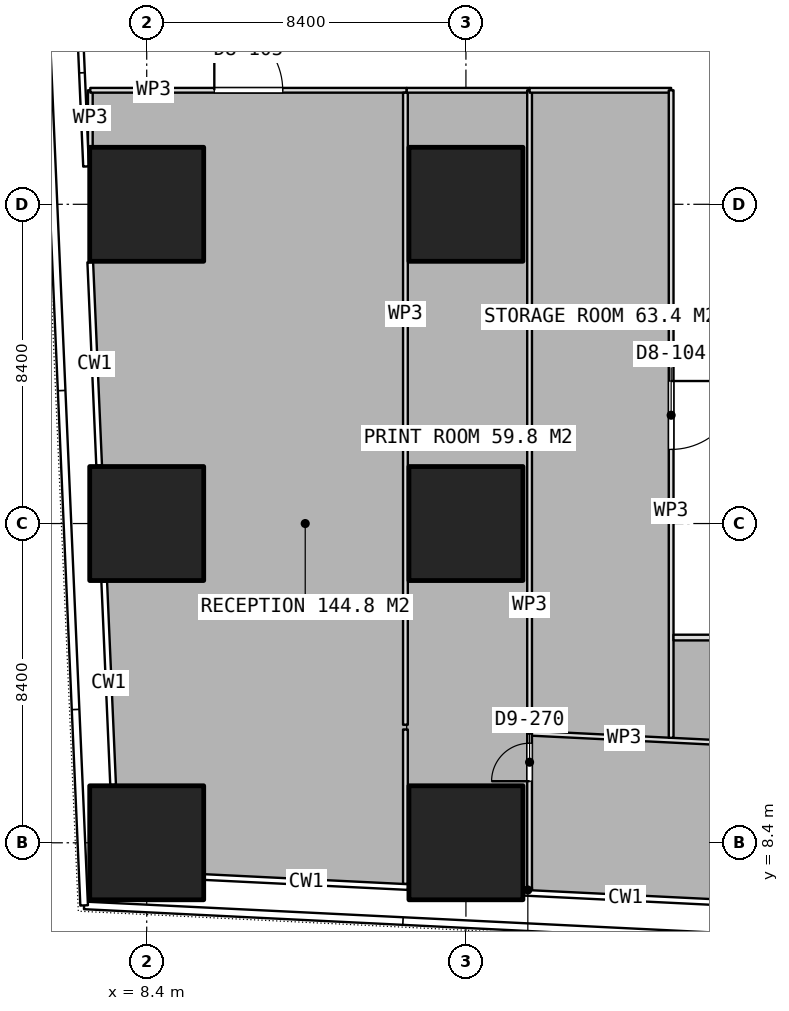
"""IFC4 building model, lengths in metres.
Left out: names, types, materials, properties, quantities, classifications, styles, units other than length and angle.
Written with IfcOpenShell. Run it as: python <this file> out.ifc"""

import sys

from ifc_helpers import new_model, si_unit, direction, frame, frame_2d, origin, origin_2d, place, context, subcontext, project, spatial, rectangle, extrude, element, fill, save


model = new_model("IFC4")
c1 = context("Model", 3, precision=1e-05, world=origin(), true_north=direction((0.0, 1.0)))
c2 = subcontext(c1, "Body", "Model", "MODEL_VIEW")
j1 = project(units=[si_unit("LENGTHUNIT", "METRE"), si_unit("PLANEANGLEUNIT", "RADIAN")], contexts=[c1])
p1 = place(None, origin())
s1 = spatial("IfcSite", under=j1, at=p1, CompositionType="ELEMENT")
p2 = place(p1, origin())
s2 = spatial("IfcBuilding", under=s1, at=p2, CompositionType="ELEMENT")
p3 = place(p2, frame((0.0, 0.0, 77.9)))
s3 = spatial("IfcBuildingStorey", under=s2, at=p3, CompositionType="ELEMENT", Elevation=77.9)
for number, where, z_axis, x_axis in (
    (1, (8.4, 8.4, 0.0), (0.0, 0.0, 1.0), (1.0, 0.0, 0.0)),
    (2, (8.4, 16.8, 0.0), (0.0, 0.0, 1.0), (1.0, 0.0, 0.0)),
    (3, (8.4, 25.2, 0.0), (0.0, 0.0, 1.0), (1.0, 0.0, 0.0)),
    (4, (16.8, 8.4, 0.0), (0.0, 0.0, 1.0), (1.0, 0.0, 0.0)),
    (5, (16.8, 16.8, 0.0), (0.0, 0.0, 1.0), (1.0, 0.0, 0.0)),
    (6, (16.8, 25.2, 0.0), (0.0, 0.0, 1.0), (1.0, 0.0, 0.0)),
):
    element("IfcColumn", number, at=place(p3, frame(where, z_axis=z_axis, x_axis=x_axis)), inside=s3, PredefinedType="COLUMN", context=c2, shape_type="SweptSolid", body=[
        extrude(rectangle(XDim=3.0, YDim=3.0, at=origin_2d()), origin(), (0.0, 0.0, 1.0), 3.75),
    ])
p4 = place(p3, frame((15.208, 11.381, 0.0), z_axis=(0.0, 0.0, 1.0), x_axis=(0.0, -1.0, 0.0)))
e7 = element("IfcWall", 7, at=p4, inside=s3, PredefinedType="PARTITIONING", context=c2, shape_type="SweptSolid", body=[
    extrude(rectangle(XDim=4.063, YDim=0.125, at=frame_2d((2.031, 0.0))), origin(), (0.0, 0.0, 1.0), 3.5),
])
p5 = place(p3, frame((18.475, 11.283, 0.0), z_axis=(0.0, 0.0, 1.0), x_axis=(0.998791733406, -0.049143395075, 0.0)))
e8 = element("IfcWall", 8, at=p5, inside=s3, PredefinedType="PARTITIONING", context=c2, shape_type="SweptSolid", body=[
    extrude(rectangle(XDim=4.983, YDim=0.125, at=frame_2d((2.491, 0.0))), origin(), (0.0, 0.0, 1.0), 3.5),
])
p6 = place(p3, frame((18.475, 7.158, 0.0), z_axis=(0.0, 0.0, 1.0), x_axis=(0.0, 1.0, 0.0)))
e9 = element("IfcWall", 9, at=p6, inside=s3, PredefinedType="PARTITIONING", context=c2, shape_type="SweptSolid", body=[
    extrude(rectangle(XDim=4.125, YDim=0.125, at=frame_2d((2.062, 0.0))), origin(), (0.0, 0.0, 1.0), 3.5),
])
p7 = place(p6, frame((2.862, 0.0, 0.0)))
e10 = element("IfcOpeningElement", 10, at=p7, cuts=e9, PredefinedType="OPENING", context=c2, shape_type="SweptSolid", body=[
    extrude(rectangle(XDim=1.0, YDim=2.1, at=frame_2d((0.5, 1.05))), frame((0.0, 0.073, 0.0), z_axis=(0.0, -1.0, 0.0), x_axis=(1.0, 0.0, 0.0)), (0.0, 0.0, 1.0), 0.145),
])
p8 = place(p3, frame((6.916, 26.72, 0.0), z_axis=(0.0, 0.0, 1.0), x_axis=(0.0, 1.0, 0.0)))
e11 = element("IfcWall", 11, at=p8, inside=s3, PredefinedType="PARTITIONING", context=c2, shape_type="SweptSolid", body=[
    extrude(rectangle(XDim=1.48, YDim=0.125, at=frame_2d((0.74, 0.0))), origin(), (0.0, 0.0, 1.0), 3.5),
])
p9 = place(p3, frame((6.916, 28.2, 0.0), z_axis=(0.0, 0.0, 1.0), x_axis=(1.0, 0.0, 0.0)))
e12 = element("IfcWall", 12, at=p9, inside=s3, PredefinedType="PARTITIONING", context=c2, shape_type="SweptSolid", body=[
    extrude(rectangle(XDim=8.326, YDim=0.125, at=frame_2d((4.163, 0.0))), origin(), (0.0, 0.0, 1.0), 3.5),
])
p10 = place(p9, frame((3.263, 0.0, 0.0)))
e13 = element("IfcOpeningElement", 13, at=p10, cuts=e12, PredefinedType="OPENING", context=c2, shape_type="SweptSolid", body=[
    extrude(rectangle(XDim=1.8, YDim=2.1, at=frame_2d((0.9, 1.05))), frame((0.0, 0.073, 0.0), z_axis=(0.0, -1.0, 0.0), x_axis=(1.0, 0.0, 0.0)), (0.0, 0.0, 1.0), 0.145),
])
p11 = place(p3, frame((15.208, 28.137, 0.0), z_axis=(0.0, 0.0, 1.0), x_axis=(0.0, -1.0, 0.0)))
e14 = element("IfcWall", 14, at=p11, inside=s3, PredefinedType="PARTITIONING", context=c2, shape_type="SweptSolid", body=[
    extrude(rectangle(XDim=16.631, YDim=0.125, at=frame_2d((8.315, 0.0))), origin(), (0.0, 0.0, 1.0), 3.5),
])
p12 = place(p3, frame((15.242, 28.2, 0.0), z_axis=(0.0, 0.0, 1.0), x_axis=(1.0, 0.0, 0.0)))
e15 = element("IfcWall", 15, at=p12, inside=s3, PredefinedType="PARTITIONING", context=c2, shape_type="SweptSolid", body=[
    extrude(rectangle(XDim=3.233, YDim=0.125, at=frame_2d((1.617, 0.0))), origin(), (0.0, 0.0, 1.0), 3.5),
])
p13 = place(p3, frame((18.475, 28.2, 0.0), z_axis=(0.0, 0.0, 1.0), x_axis=(0.0, -1.0, 0.0)))
e16 = element("IfcWall", 16, at=p13, inside=s3, PredefinedType="PARTITIONING", context=c2, shape_type="SweptSolid", body=[
    extrude(rectangle(XDim=16.917, YDim=0.125, at=frame_2d((8.458, 0.0))), origin(), (0.0, 0.0, 1.0), 3.5),
])
p14 = place(p3, frame((18.475, 28.2, 0.0), z_axis=(0.0, 0.0, 1.0), x_axis=(1.0, 0.0, 0.0)))
e17 = element("IfcWall", 17, at=p14, inside=s3, PredefinedType="PARTITIONING", context=c2, shape_type="SweptSolid", body=[
    extrude(rectangle(XDim=3.725, YDim=0.125, at=frame_2d((1.862, 0.0))), origin(), (0.0, 0.0, 1.0), 3.5),
])
p15 = place(p3, frame((22.2, 28.2, 0.0), z_axis=(0.0, 0.0, 1.0), x_axis=(0.0, -1.0, 0.0)))
e18 = element("IfcWall", 18, at=p15, inside=s3, PredefinedType="PARTITIONING", context=c2, shape_type="SweptSolid", body=[
    extrude(rectangle(XDim=17.038, YDim=0.125, at=frame_2d((8.519, 0.0))), origin(), (0.0, 0.0, 1.0), 3.5),
])
p16 = place(p15, frame((7.65, 0.0, 0.0)))
e19 = element("IfcOpeningElement", 19, at=p16, cuts=e18, PredefinedType="OPENING", context=c2, shape_type="SweptSolid", body=[
    extrude(rectangle(XDim=1.8, YDim=2.1, at=frame_2d((0.9, 1.05))), frame((0.0, 0.073, 0.0), z_axis=(0.0, -1.0, 0.0), x_axis=(1.0, 0.0, 0.0)), (0.0, 0.0, 1.0), 0.145),
])
p17 = place(p3, frame((22.262, 13.8, 0.0), z_axis=(0.0, 0.0, 1.0), x_axis=(1.0, 0.0, 0.0)))
e20 = element("IfcWall", 20, at=p17, inside=s3, PredefinedType="PARTITIONING", context=c2, shape_type="SweptSolid", body=[
    extrude(rectangle(XDim=14.038, YDim=0.15, at=frame_2d((7.019, 0.0))), origin(), (0.0, 0.0, 1.0), 3.5),
])
p18 = place(p3, frame((18.538, 7.158, 0.0), z_axis=(0.0, 0.0, 1.0), x_axis=(-1.0, 0.0, 0.0)))
e21 = element("IfcWall", 21, at=p18, inside=s3, PredefinedType="PARTITIONING", context=c2, shape_type="SweptSolid", body=[
    extrude(rectangle(XDim=0.218, YDim=0.125, at=frame_2d((0.109, 0.0))), origin(), (0.0, 0.0, 1.0), 3.5),
])
p19 = place(p10, origin())
e22 = element("IfcDoor", 22, at=p19, inside=s3, OperationType="DOUBLE_DOOR_SINGLE_SWING", PredefinedType="DOOR", context=c2, shape_type="SweptSolid", body=[
    extrude(rectangle(XDim=1.8, YDim=2.1, at=frame_2d((0.9, 1.05))), frame((0.0, 0.025, 0.0), z_axis=(0.0, -1.0, 0.0), x_axis=(1.0, 0.0, 0.0)), (0.0, 0.0, 1.0), 0.05),
])
fill(e13, e22)
p20 = place(p16, origin())
e23 = element("IfcDoor", 23, at=p20, inside=s3, OperationType="DOUBLE_DOOR_SINGLE_SWING", PredefinedType="DOOR", context=c2, shape_type="SweptSolid", body=[
    extrude(rectangle(XDim=1.8, YDim=2.1, at=frame_2d((0.9, 1.05))), frame((0.0, 0.025, 0.0), z_axis=(0.0, -1.0, 0.0), x_axis=(1.0, 0.0, 0.0)), (0.0, 0.0, 1.0), 0.05),
])
fill(e19, e23)
p21 = place(p7, origin())
e24 = element("IfcDoor", 24, at=p21, inside=s3, OperationType="SINGLE_SWING_LEFT", PredefinedType="DOOR", context=c2, shape_type="SweptSolid", body=[
    extrude(rectangle(XDim=1.0, YDim=2.1, at=frame_2d((0.5, 1.05))), frame((0.0, 0.025, 0.0), z_axis=(0.0, -1.0, 0.0), x_axis=(1.0, 0.0, 0.0)), (0.0, 0.0, 1.0), 0.05),
])
fill(e10, e24)
save(model, sys.argv[1])
